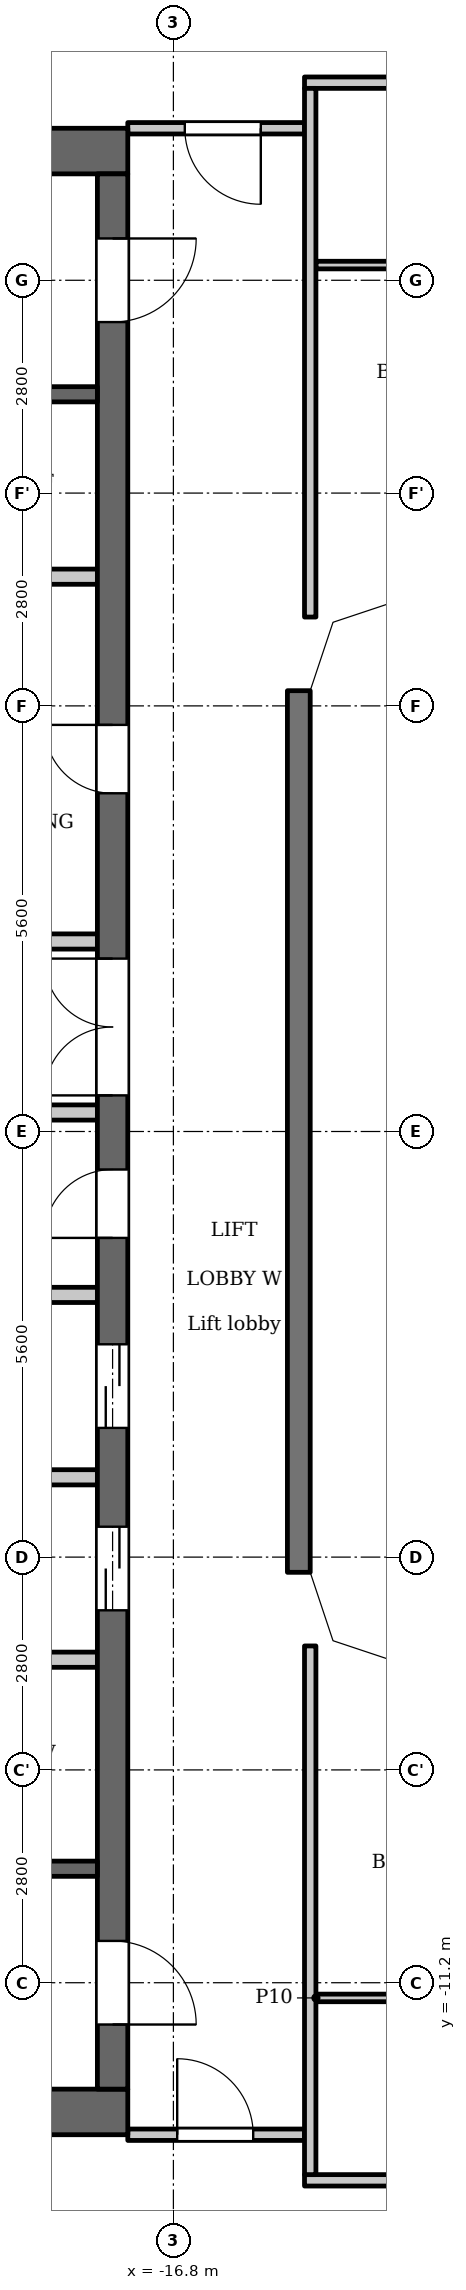
"""IFC4 building model, lengths in metres.
Left out: names, types, materials, properties, quantities, classifications, styles, units other than length and angle.
Written with IfcOpenShell. Run it as: python <this file> out.ifc"""

import sys

from ifc_helpers import new_model, si_unit, direction, frame, frame_2d, origin, place, context, subcontext, project, spatial, polyline, rectangle, outline, extrude, element, fill, save


model = new_model("IFC4")
c1 = context("Model", 3, precision=1e-05, world=origin(), true_north=direction((0.0, 1.0)))
c2 = subcontext(c1, "Body", "Model", "MODEL_VIEW")
j1 = project(units=[si_unit("LENGTHUNIT", "METRE"), si_unit("PLANEANGLEUNIT", "RADIAN")], contexts=[c1])
p1 = place(None, origin())
s1 = spatial("IfcSite", under=j1, at=p1, CompositionType="ELEMENT")
p2 = place(p1, origin())
s2 = spatial("IfcBuilding", under=s1, at=p2, CompositionType="ELEMENT")
p3 = place(p2, frame((0.0, 0.0, 269.7)))
s3 = spatial("IfcBuildingStorey", under=s2, at=p3, CompositionType="ELEMENT", Elevation=269.7)
p4 = place(p3, frame((-15.15, -5.8, 0.0), z_axis=(0.0, 0.0, 1.0), x_axis=(0.0, 1.0, 0.0)))
e1 = element("IfcWall", 1, at=p4, inside=s3, PredefinedType="SOLIDWALL", context=c2, shape_type="SweptSolid", body=[
    extrude(rectangle(XDim=11.6, YDim=0.3, at=frame_2d((5.8, 0.0))), origin(), (0.0, 0.0, 1.0), 3.2),
])
for number, where, z_axis, x_axis in (
    (2, (-17.4, 12.9, 0.0), (0.0, 0.0, 1.0), (-1.0, 0.0, 0.0)),
    (3, (-17.4, -12.9, 0.0), (0.0, 0.0, 1.0), (-1.0, 0.0, 0.0)),
):
    element("IfcWall", number, at=place(p3, frame(where, z_axis=z_axis, x_axis=x_axis)), inside=s3, PredefinedType="SHEAR", context=c2, shape_type="SweptSolid", body=[
        extrude(rectangle(XDim=7.32, YDim=0.6, at=frame_2d((3.66, 0.0))), origin(), (0.0, 0.0, 1.0), 3.2),
    ])
p5 = place(p3, frame((-17.6, -12.6, 0.0), z_axis=(0.0, 0.0, 1.0), x_axis=(0.0, 1.0, 0.0)))
e4 = element("IfcWall", 4, at=p5, inside=s3, PredefinedType="SHEAR", context=c2, shape_type="SweptSolid", body=[
    extrude(rectangle(XDim=25.2, YDim=0.4, at=frame_2d((12.6, 0.0))), origin(), (0.0, 0.0, 1.0), 3.2),
])
p6 = place(p5, frame((6.3, 0.0, 0.0)))
e5 = element("IfcOpeningElement", 5, at=p6, cuts=e4, PredefinedType="OPENING", context=c2, shape_type="SweptSolid", body=[
    extrude(rectangle(XDim=1.1, YDim=2.1, at=frame_2d((0.55, 1.05))), frame((0.0, 0.21, 0.0), z_axis=(0.0, -1.0, 0.0), x_axis=(1.0, 0.0, 0.0)), (0.0, 0.0, 1.0), 0.42),
])
p7 = place(p5, frame((8.7, 0.0, 0.0)))
e6 = element("IfcOpeningElement", 6, at=p7, cuts=e4, PredefinedType="OPENING", context=c2, shape_type="SweptSolid", body=[
    extrude(rectangle(XDim=1.1, YDim=2.1, at=frame_2d((0.55, 1.05))), frame((0.0, 0.21, 0.0), z_axis=(0.0, -1.0, 0.0), x_axis=(1.0, 0.0, 0.0)), (0.0, 0.0, 1.0), 0.42),
])
p8 = place(p5, frame((11.2, 0.0, 0.0)))
e7 = element("IfcOpeningElement", 7, at=p8, cuts=e4, PredefinedType="OPENING", context=c2, shape_type="SweptSolid", body=[
    extrude(rectangle(XDim=0.9, YDim=2.1, at=frame_2d((0.45, 1.05))), frame((0.0, 0.21, 0.0), z_axis=(0.0, -1.0, 0.0), x_axis=(1.0, 0.0, 0.0)), (0.0, 0.0, 1.0), 0.42),
])
p9 = place(p5, frame((17.05, 0.0, 0.0)))
e8 = element("IfcOpeningElement", 8, at=p9, cuts=e4, PredefinedType="OPENING", context=c2, shape_type="SweptSolid", body=[
    extrude(rectangle(XDim=0.9, YDim=2.1, at=frame_2d((0.45, 1.05))), frame((0.0, 0.21, 0.0), z_axis=(0.0, -1.0, 0.0), x_axis=(1.0, 0.0, 0.0)), (0.0, 0.0, 1.0), 0.42),
])
p10 = place(p5, frame((23.25, 0.0, 0.0)))
e9 = element("IfcOpeningElement", 9, at=p10, cuts=e4, PredefinedType="OPENING", context=c2, shape_type="SweptSolid", body=[
    extrude(rectangle(XDim=1.1, YDim=2.1, at=frame_2d((0.55, 1.05))), frame((0.0, 0.21, 0.0), z_axis=(0.0, -1.0, 0.0), x_axis=(1.0, 0.0, 0.0)), (0.0, 0.0, 1.0), 0.42),
])
p11 = place(p5, frame((0.85, 0.0, 0.0)))
e10 = element("IfcOpeningElement", 10, at=p11, cuts=e4, PredefinedType="OPENING", context=c2, shape_type="SweptSolid", body=[
    extrude(rectangle(XDim=1.1, YDim=2.1, at=frame_2d((0.55, 1.05))), frame((0.0, 0.21, 0.0), z_axis=(0.0, -1.0, 0.0), x_axis=(1.0, 0.0, 0.0)), (0.0, 0.0, 1.0), 0.42),
])
p12 = place(p5, frame((13.075, 0.0, 0.0)))
e11 = element("IfcOpeningElement", 11, at=p12, cuts=e4, PredefinedType="OPENING", context=c2, shape_type="SweptSolid", body=[
    extrude(rectangle(XDim=1.8, YDim=2.1, at=frame_2d((0.9, 1.05))), frame((0.0, 0.21, 0.0), z_axis=(0.0, -1.0, 0.0), x_axis=(1.0, 0.0, 0.0)), (0.0, 0.0, 1.0), 0.42),
])
p13 = place(p3, frame((-17.8, -9.7, 0.0), z_axis=(0.0, 0.0, 1.0), x_axis=(-1.0, 0.0, 0.0)))
e12 = element("IfcWall", 12, at=p13, inside=s3, PredefinedType="SHEAR", context=c2, shape_type="SweptSolid", body=[
    extrude(rectangle(XDim=5.8, YDim=0.2, at=frame_2d((2.9, 0.0))), origin(), (0.0, 0.0, 1.0), 3.2),
])
p14 = place(p13, frame((0.85, 0.0, 0.0)))
e13 = element("IfcOpeningElement", 13, at=p14, cuts=e12, PredefinedType="OPENING", context=c2, shape_type="SweptSolid", body=[
    extrude(rectangle(XDim=1.1, YDim=2.1, at=frame_2d((0.55, 1.05))), frame((0.0, 0.11, 0.0), z_axis=(0.0, -1.0, 0.0), x_axis=(1.0, 0.0, 0.0)), (0.0, 0.0, 1.0), 0.22),
])
p15 = place(p13, frame((3.75, 0.0, 0.0)))
e14 = element("IfcOpeningElement", 14, at=p15, cuts=e12, PredefinedType="OPENING", context=c2, shape_type="SweptSolid", body=[
    extrude(rectangle(XDim=1.1, YDim=2.1, at=frame_2d((0.55, 1.05))), frame((0.0, 0.11, 0.0), z_axis=(0.0, -1.0, 0.0), x_axis=(1.0, 0.0, 0.0)), (0.0, 0.0, 1.0), 0.22),
])
for number, where, z_axis, x_axis in (
    (15, (-17.8, -6.95, 0.0), (0.0, 0.0, 1.0), (-1.0, 0.0, 0.0)),
    (16, (-17.8, -4.55, 0.0), (0.0, 0.0, 1.0), (-1.0, 0.0, 0.0)),
    (17, (-17.8, -2.15, 0.0), (0.0, 0.0, 1.0), (-1.0, 0.0, 0.0)),
):
    element("IfcWall", number, at=place(p3, frame(where, z_axis=z_axis, x_axis=x_axis)), inside=s3, PredefinedType="PARTITIONING", context=c2, shape_type="SweptSolid", body=[
        extrude(rectangle(XDim=2.8, YDim=0.2, at=frame_2d((1.4, 0.0))), origin(), (0.0, 0.0, 1.0), 3.2),
    ])
for number, where, z_axis, x_axis in (
    (18, (-17.8, 0.25, 0.0), (0.0, 0.0, 1.0), (-1.0, 0.0, 0.0)),
    (19, (-17.8, 2.5, 0.0), (0.0, 0.0, 1.0), (-1.0, 0.0, 0.0)),
):
    element("IfcWall", number, at=place(p3, frame(where, z_axis=z_axis, x_axis=x_axis)), inside=s3, PredefinedType="PARTITIONING", context=c2, shape_type="SweptSolid", body=[
        extrude(rectangle(XDim=3.0, YDim=0.2, at=frame_2d((1.5, 0.0))), origin(), (0.0, 0.0, 1.0), 3.2),
    ])
p16 = place(p3, frame((-17.8, 7.3, 0.0), z_axis=(0.0, 0.0, 1.0), x_axis=(-1.0, 0.0, 0.0)))
e20 = element("IfcWall", 20, at=p16, inside=s3, PredefinedType="PARTITIONING", context=c2, shape_type="SweptSolid", body=[
    extrude(rectangle(XDim=2.8, YDim=0.2, at=frame_2d((1.4, 0.0))), origin(), (0.0, 0.0, 1.0), 3.2),
])
p17 = place(p3, frame((-17.8, 9.7, 0.0), z_axis=(0.0, 0.0, 1.0), x_axis=(-1.0, 0.0, 0.0)))
e21 = element("IfcWall", 21, at=p17, inside=s3, PredefinedType="SHEAR", context=c2, shape_type="SweptSolid", body=[
    extrude(rectangle(XDim=5.8, YDim=0.2, at=frame_2d((2.9, 0.0))), origin(), (0.0, 0.0, 1.0), 3.2),
])
p18 = place(p17, frame((0.85, 0.0, 0.0)))
e22 = element("IfcOpeningElement", 22, at=p18, cuts=e21, PredefinedType="OPENING", context=c2, shape_type="SweptSolid", body=[
    extrude(rectangle(XDim=1.1, YDim=2.1, at=frame_2d((0.55, 1.05))), frame((0.0, 0.11, 0.0), z_axis=(0.0, -1.0, 0.0), x_axis=(1.0, 0.0, 0.0)), (0.0, 0.0, 1.0), 0.22),
])
p19 = place(p17, frame((3.75, 0.0, 0.0)))
e23 = element("IfcOpeningElement", 23, at=p19, cuts=e21, PredefinedType="OPENING", context=c2, shape_type="SweptSolid", body=[
    extrude(rectangle(XDim=1.1, YDim=2.1, at=frame_2d((0.55, 1.05))), frame((0.0, 0.11, 0.0), z_axis=(0.0, -1.0, 0.0), x_axis=(1.0, 0.0, 0.0)), (0.0, 0.0, 1.0), 0.22),
])
p20 = place(p3, frame((-15.075, -13.8, 0.0), z_axis=(0.0, 0.0, 1.0), x_axis=(1.0, 0.0, 0.0)))
e24 = element("IfcWall", 24, at=p20, inside=s3, PredefinedType="PARTITIONING", context=c2, shape_type="SweptSolid", body=[
    extrude(rectangle(XDim=30.15, YDim=0.15, at=frame_2d((15.075, 0.0))), origin(), (0.0, 0.0, 1.0), 3.2),
])
p21 = place(p20, frame((10.175, 0.0, 0.0)))
e25 = element("IfcOpeningElement", 25, at=p21, cuts=e24, PredefinedType="OPENING", context=c2, shape_type="SweptSolid", body=[
    extrude(rectangle(XDim=1.0, YDim=2.1, at=frame_2d((0.5, 1.05))), frame((0.0, 0.085, 0.0), z_axis=(0.0, -1.0, 0.0), x_axis=(1.0, 0.0, 0.0)), (0.0, 0.0, 1.0), 0.17),
])
p22 = place(p20, frame((15.775, 0.0, 0.0)))
e26 = element("IfcOpeningElement", 26, at=p22, cuts=e24, PredefinedType="OPENING", context=c2, shape_type="SweptSolid", body=[
    extrude(rectangle(XDim=1.0, YDim=2.1, at=frame_2d((0.5, 1.05))), frame((0.0, 0.085, 0.0), z_axis=(0.0, -1.0, 0.0), x_axis=(1.0, 0.0, 0.0)), (0.0, 0.0, 1.0), 0.17),
])
p23 = place(p3, frame((-17.4, -13.2, 0.0), z_axis=(0.0, 0.0, 1.0), x_axis=(1.0, 0.0, 0.0)))
e27 = element("IfcWall", 27, at=p23, inside=s3, PredefinedType="PARTITIONING", context=c2, shape_type="SweptSolid", body=[
    extrude(rectangle(XDim=2.325, YDim=0.15, at=frame_2d((1.163, 0.0))), origin(), (0.0, 0.0, 1.0), 3.2),
])
p24 = place(p23, frame((0.65, 0.0, 0.0)))
e28 = element("IfcOpeningElement", 28, at=p24, cuts=e27, PredefinedType="OPENING", context=c2, shape_type="SweptSolid", body=[
    extrude(rectangle(XDim=1.0, YDim=2.1, at=frame_2d((0.5, 1.05))), frame((0.0, 0.085, 0.0), z_axis=(0.0, -1.0, 0.0), x_axis=(1.0, 0.0, 0.0)), (0.0, 0.0, 1.0), 0.17),
])
p25 = place(p3, frame((-14.925, -11.4, 0.0), z_axis=(0.0, 0.0, 1.0), x_axis=(1.0, 0.0, 0.0)))
e29 = element("IfcWall", 29, at=p25, inside=s3, PredefinedType="PARTITIONING", context=c2, shape_type="SweptSolid", body=[
    extrude(rectangle(XDim=29.85, YDim=0.1, at=frame_2d((14.925, 0.0))), origin(), (0.0, 0.0, 1.0), 3.2),
])
p26 = place(p25, frame((13.375, 0.0, 0.0)))
e30 = element("IfcOpeningElement", 30, at=p26, cuts=e29, PredefinedType="OPENING", context=c2, shape_type="SweptSolid", body=[
    extrude(rectangle(XDim=0.9, YDim=2.1, at=frame_2d((0.45, 1.05))), frame((0.0, 0.06, 0.0), z_axis=(0.0, -1.0, 0.0), x_axis=(1.0, 0.0, 0.0)), (0.0, 0.0, 1.0), 0.12),
])
p27 = place(p25, frame((4.775, 0.0, 0.0)))
e31 = element("IfcOpeningElement", 31, at=p27, cuts=e29, PredefinedType="OPENING", context=c2, shape_type="SweptSolid", body=[
    extrude(rectangle(XDim=0.9, YDim=2.1, at=frame_2d((0.45, 1.05))), frame((0.0, 0.06, 0.0), z_axis=(0.0, -1.0, 0.0), x_axis=(1.0, 0.0, 0.0)), (0.0, 0.0, 1.0), 0.12),
])
p28 = place(p25, frame((18.475, 0.0, 0.0)))
e32 = element("IfcOpeningElement", 32, at=p28, cuts=e29, PredefinedType="OPENING", context=c2, shape_type="SweptSolid", body=[
    extrude(rectangle(XDim=0.9, YDim=2.1, at=frame_2d((0.45, 1.05))), frame((0.0, 0.06, 0.0), z_axis=(0.0, -1.0, 0.0), x_axis=(1.0, 0.0, 0.0)), (0.0, 0.0, 1.0), 0.12),
])
p29 = place(p25, frame((21.825, 0.0, 0.0)))
e33 = element("IfcOpeningElement", 33, at=p29, cuts=e29, PredefinedType="OPENING", context=c2, shape_type="SweptSolid", body=[
    extrude(rectangle(XDim=0.9, YDim=2.1, at=frame_2d((0.45, 1.05))), frame((0.0, 0.06, 0.0), z_axis=(0.0, -1.0, 0.0), x_axis=(1.0, 0.0, 0.0)), (0.0, 0.0, 1.0), 0.12),
])
p30 = place(p3, frame((-14.925, 11.4, 0.0), z_axis=(0.0, 0.0, 1.0), x_axis=(1.0, 0.0, 0.0)))
e34 = element("IfcWall", 34, at=p30, inside=s3, PredefinedType="PARTITIONING", context=c2, shape_type="SweptSolid", body=[
    extrude(rectangle(XDim=29.85, YDim=0.1, at=frame_2d((14.925, 0.0))), origin(), (0.0, 0.0, 1.0), 3.2),
])
p31 = place(p30, frame((13.475, 0.0, 0.0)))
e35 = element("IfcOpeningElement", 35, at=p31, cuts=e34, PredefinedType="OPENING", context=c2, shape_type="SweptSolid", body=[
    extrude(rectangle(XDim=0.9, YDim=2.1, at=frame_2d((0.45, 1.05))), frame((0.0, 0.06, 0.0), z_axis=(0.0, -1.0, 0.0), x_axis=(1.0, 0.0, 0.0)), (0.0, 0.0, 1.0), 0.12),
])
p32 = place(p30, frame((4.625, 0.0, 0.0)))
e36 = element("IfcOpeningElement", 36, at=p32, cuts=e34, PredefinedType="OPENING", context=c2, shape_type="SweptSolid", body=[
    extrude(rectangle(XDim=0.9, YDim=2.1, at=frame_2d((0.45, 1.05))), frame((0.0, 0.06, 0.0), z_axis=(0.0, -1.0, 0.0), x_axis=(1.0, 0.0, 0.0)), (0.0, 0.0, 1.0), 0.12),
])
p33 = place(p30, frame((18.075, 0.0, 0.0)))
e37 = element("IfcOpeningElement", 37, at=p33, cuts=e34, PredefinedType="OPENING", context=c2, shape_type="SweptSolid", body=[
    extrude(rectangle(XDim=0.8, YDim=2.1, at=frame_2d((0.4, 1.05))), frame((0.0, 0.06, 0.0), z_axis=(0.0, -1.0, 0.0), x_axis=(1.0, 0.0, 0.0)), (0.0, 0.0, 1.0), 0.12),
])
p34 = place(p30, frame((15.575, 0.0, 0.0)))
e38 = element("IfcOpeningElement", 38, at=p34, cuts=e34, PredefinedType="OPENING", context=c2, shape_type="SweptSolid", body=[
    extrude(rectangle(XDim=0.9, YDim=2.1, at=frame_2d((0.45, 1.05))), frame((0.0, 0.06, 0.0), z_axis=(0.0, -1.0, 0.0), x_axis=(1.0, 0.0, 0.0)), (0.0, 0.0, 1.0), 0.12),
])
p35 = place(p30, frame((28.474, 0.0, 0.0)))
e39 = element("IfcOpeningElement", 39, at=p35, cuts=e34, PredefinedType="OPENING", context=c2, shape_type="SweptSolid", body=[
    extrude(rectangle(XDim=0.8, YDim=2.1, at=frame_2d((0.4, 1.05))), frame((0.0, 0.06, 0.0), z_axis=(0.0, -1.0, 0.0), x_axis=(1.0, 0.0, 0.0)), (0.0, 0.0, 1.0), 0.12),
])
p36 = place(p30, frame((23.425, 0.0, 0.0)))
e40 = element("IfcOpeningElement", 40, at=p36, cuts=e34, PredefinedType="OPENING", context=c2, shape_type="SweptSolid", body=[
    extrude(rectangle(XDim=0.9, YDim=2.1, at=frame_2d((0.45, 1.05))), frame((0.0, 0.06, 0.0), z_axis=(0.0, -1.0, 0.0), x_axis=(1.0, 0.0, 0.0)), (0.0, 0.0, 1.0), 0.12),
])
p37 = place(p3, frame((-17.4, 13.2, 0.0), z_axis=(0.0, 0.0, 1.0), x_axis=(1.0, 0.0, 0.0)))
e41 = element("IfcWall", 41, at=p37, inside=s3, PredefinedType="PARTITIONING", context=c2, shape_type="SweptSolid", body=[
    extrude(rectangle(XDim=2.325, YDim=0.15, at=frame_2d((1.163, 0.0))), origin(), (0.0, 0.0, 1.0), 3.2),
])
p38 = place(p37, frame((0.75, 0.0, 0.0)))
e42 = element("IfcOpeningElement", 42, at=p38, cuts=e41, PredefinedType="OPENING", context=c2, shape_type="SweptSolid", body=[
    extrude(rectangle(XDim=1.0, YDim=2.1, at=frame_2d((0.5, 1.05))), frame((0.0, 0.085, 0.0), z_axis=(0.0, -1.0, 0.0), x_axis=(1.0, 0.0, 0.0)), (0.0, 0.0, 1.0), 0.17),
])
p39 = place(p3, frame((-15.075, 13.8, 0.0), z_axis=(0.0, 0.0, 1.0), x_axis=(1.0, 0.0, 0.0)))
e43 = element("IfcWall", 43, at=p39, inside=s3, PredefinedType="PARTITIONING", context=c2, shape_type="SweptSolid", body=[
    extrude(rectangle(XDim=30.15, YDim=0.15, at=frame_2d((15.075, 0.0))), origin(), (0.0, 0.0, 1.0), 3.2),
])
p40 = place(p39, frame((10.125, 0.0, 0.0)))
e44 = element("IfcOpeningElement", 44, at=p40, cuts=e43, PredefinedType="OPENING", context=c2, shape_type="SweptSolid", body=[
    extrude(rectangle(XDim=1.0, YDim=2.1, at=frame_2d((0.5, 1.05))), frame((0.0, 0.085, 0.0), z_axis=(0.0, -1.0, 0.0), x_axis=(1.0, 0.0, 0.0)), (0.0, 0.0, 1.0), 0.17),
])
p41 = place(p39, frame((15.725, 0.0, 0.0)))
e45 = element("IfcOpeningElement", 45, at=p41, cuts=e43, PredefinedType="OPENING", context=c2, shape_type="SweptSolid", body=[
    extrude(rectangle(XDim=1.0, YDim=2.1, at=frame_2d((0.5, 1.05))), frame((0.0, 0.085, 0.0), z_axis=(0.0, -1.0, 0.0), x_axis=(1.0, 0.0, 0.0)), (0.0, 0.0, 1.0), 0.17),
])
p42 = place(p39, frame((24.575, 0.0, 0.0)))
e46 = element("IfcOpeningElement", 46, at=p42, cuts=e43, PredefinedType="OPENING", context=c2, shape_type="SweptSolid", body=[
    extrude(rectangle(XDim=1.0, YDim=2.1, at=frame_2d((0.5, 1.05))), frame((0.0, 0.085, 0.0), z_axis=(0.0, -1.0, 0.0), x_axis=(1.0, 0.0, 0.0)), (0.0, 0.0, 1.0), 0.17),
])
for number, where, z_axis, x_axis in (
    (47, (-15.0, -13.725, 0.0), (0.0, 0.0, 1.0), (0.0, 1.0, 0.0)),
    (48, (-15.0, 6.769, 0.0), (0.0, 0.0, 1.0), (0.0, 1.0, 0.0)),
):
    element("IfcWall", number, at=place(p3, frame(where, z_axis=z_axis, x_axis=x_axis)), inside=s3, PredefinedType="PARTITIONING", context=c2, shape_type="SweptSolid", body=[
        extrude(rectangle(XDim=6.956, YDim=0.15, at=frame_2d((3.478, 0.0))), origin(), (0.0, 0.0, 1.0), 3.2),
    ])
p43 = place(p3, origin())
e49 = element("IfcWall", 49, at=p43, inside=s3, PredefinedType="SOLIDWALL", context=c2, shape_type="SweptSolid", body=[
    extrude(outline(polyline([(-13.849, 7.3), (-14.937, 6.937), (-15.3, 5.849), (-15.3, 5.8), (-15.0, 5.8), (-14.7, 6.7), (-13.8, 7.0), (-13.8, 7.3), (-13.849, 7.3)])), origin(), (0.0, 0.0, 1.0), 3.2),
])
e50 = element("IfcWall", 50, at=p43, inside=s3, PredefinedType="SOLIDWALL", context=c2, shape_type="SweptSolid", body=[
    extrude(outline(polyline([(-14.937, -6.937), (-13.849, -7.3), (-13.8, -7.3), (-13.8, -7.0), (-14.7, -6.7), (-15.0, -5.8), (-15.3, -5.8), (-15.3, -5.849), (-14.937, -6.937)])), origin(), (0.0, 0.0, 1.0), 3.2),
])
p44 = place(p6, origin())
e51 = element("IfcDoor", 51, at=p44, inside=s3, OperationType="DOUBLE_DOOR_SLIDING", PredefinedType="DOOR", context=c2, shape_type="SweptSolid", body=[
    extrude(rectangle(XDim=1.1, YDim=2.1, at=frame_2d((0.55, 1.05))), frame((0.0, 0.025, 0.0), z_axis=(0.0, -1.0, 0.0), x_axis=(1.0, 0.0, 0.0)), (0.0, 0.0, 1.0), 0.05),
])
fill(e5, e51)
p45 = place(p7, origin())
e52 = element("IfcDoor", 52, at=p45, inside=s3, OperationType="DOUBLE_DOOR_SLIDING", PredefinedType="DOOR", context=c2, shape_type="SweptSolid", body=[
    extrude(rectangle(XDim=1.1, YDim=2.1, at=frame_2d((0.55, 1.05))), frame((0.0, 0.025, 0.0), z_axis=(0.0, -1.0, 0.0), x_axis=(1.0, 0.0, 0.0)), (0.0, 0.0, 1.0), 0.05),
])
fill(e6, e52)
p46 = place(p8, origin())
e53 = element("IfcDoor", 53, at=p46, inside=s3, OperationType="SINGLE_SWING_RIGHT", PredefinedType="DOOR", context=c2, shape_type="SweptSolid", body=[
    extrude(rectangle(XDim=0.9, YDim=2.1, at=frame_2d((0.45, 1.05))), frame((0.0, 0.025, 0.0), z_axis=(0.0, -1.0, 0.0), x_axis=(1.0, 0.0, 0.0)), (0.0, 0.0, 1.0), 0.05),
])
fill(e7, e53)
p47 = place(p9, origin())
e54 = element("IfcDoor", 54, at=p47, inside=s3, OperationType="SINGLE_SWING_LEFT", PredefinedType="DOOR", context=c2, shape_type="SweptSolid", body=[
    extrude(rectangle(XDim=0.9, YDim=2.1, at=frame_2d((0.45, 1.05))), frame((0.0, 0.025, 0.0), z_axis=(0.0, -1.0, 0.0), x_axis=(1.0, 0.0, 0.0)), (0.0, 0.0, 1.0), 0.05),
])
fill(e8, e54)
p48 = place(p10, origin())
e55 = element("IfcDoor", 55, at=p48, inside=s3, OperationType="SINGLE_SWING_RIGHT", PredefinedType="DOOR", context=c2, shape_type="SweptSolid", body=[
    extrude(rectangle(XDim=1.1, YDim=2.1, at=frame_2d((0.55, 1.05))), frame((0.0, 0.025, 0.0), z_axis=(0.0, -1.0, 0.0), x_axis=(1.0, 0.0, 0.0)), (0.0, 0.0, 1.0), 0.05),
])
fill(e9, e55)
p49 = place(p11, origin())
e56 = element("IfcDoor", 56, at=p49, inside=s3, OperationType="SINGLE_SWING_LEFT", PredefinedType="DOOR", context=c2, shape_type="SweptSolid", body=[
    extrude(rectangle(XDim=1.1, YDim=2.1, at=frame_2d((0.55, 1.05))), frame((0.0, 0.025, 0.0), z_axis=(0.0, -1.0, 0.0), x_axis=(1.0, 0.0, 0.0)), (0.0, 0.0, 1.0), 0.05),
])
fill(e10, e56)
p50 = place(p12, origin())
e57 = element("IfcDoor", 57, at=p50, inside=s3, OperationType="DOUBLE_DOOR_SINGLE_SWING", PredefinedType="DOOR", context=c2, shape_type="SweptSolid", body=[
    extrude(rectangle(XDim=1.8, YDim=2.1, at=frame_2d((0.9, 1.05))), frame((0.0, 0.025, 0.0), z_axis=(0.0, -1.0, 0.0), x_axis=(1.0, 0.0, 0.0)), (0.0, 0.0, 1.0), 0.05),
])
fill(e11, e57)
p51 = place(p38, origin())
e58 = element("IfcDoor", 58, at=p51, inside=s3, OperationType="SINGLE_SWING_RIGHT", PredefinedType="DOOR", context=c2, shape_type="SweptSolid", body=[
    extrude(rectangle(XDim=1.0, YDim=2.1, at=frame_2d((0.5, 1.05))), frame((0.0, 0.025, 0.0), z_axis=(0.0, -1.0, 0.0), x_axis=(1.0, 0.0, 0.0)), (0.0, 0.0, 1.0), 0.05),
])
fill(e42, e58)
p52 = place(p24, origin())
e59 = element("IfcDoor", 59, at=p52, inside=s3, OperationType="SINGLE_SWING_RIGHT", PredefinedType="DOOR", context=c2, shape_type="SweptSolid", body=[
    extrude(rectangle(XDim=1.0, YDim=2.1, at=frame_2d((0.5, 1.05))), frame((0.0, 0.025, 0.0), z_axis=(0.0, -1.0, 0.0), x_axis=(1.0, 0.0, 0.0)), (0.0, 0.0, 1.0), 0.05),
])
fill(e28, e59)
save(model, sys.argv[1])
